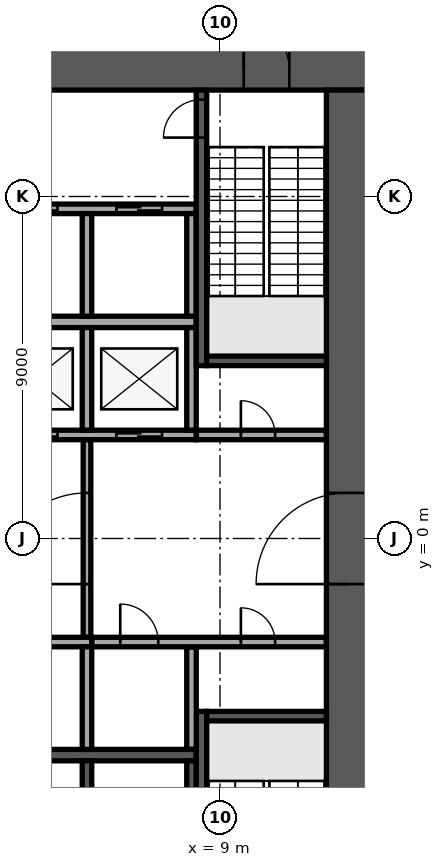
"""IFC4 building model, lengths in metres.
Left out: names, types, materials, properties, quantities, classifications, styles, units other than length and angle.
Written with IfcOpenShell. Run it as: python <this file> out.ifc"""

import sys

from ifc_helpers import new_model, si_unit, direction, frame, frame_2d, origin, place, context, subcontext, project, spatial, rectangle, extrude, element, fill, save


model = new_model("IFC4")
c1 = context("Model", 3, precision=1e-05, world=origin(), true_north=direction((0.0, 1.0)))
c2 = subcontext(c1, "Body", "Model", "MODEL_VIEW")
j1 = project(units=[si_unit("LENGTHUNIT", "METRE"), si_unit("PLANEANGLEUNIT", "RADIAN")], contexts=[c1])
p1 = place(None, origin())
s1 = spatial("IfcSite", under=j1, at=p1, CompositionType="ELEMENT")
p2 = place(p1, origin())
s2 = spatial("IfcBuilding", under=s1, at=p2, CompositionType="ELEMENT")
p3 = place(p2, frame((0.0, 0.0, 130.1)))
s3 = spatial("IfcBuildingStorey", under=s2, at=p3, CompositionType="ELEMENT", Elevation=130.1)
p4 = place(p3, frame((-12.9, 12.35, 0.0), z_axis=(0.0, 0.0, 1.0), x_axis=(1.0, 0.0, 0.0)))
e1 = element("IfcWall", 1, at=p4, inside=s3, PredefinedType="SHEAR", context=c2, shape_type="SweptSolid", body=[
    extrude(rectangle(XDim=25.8, YDim=1.1, at=frame_2d((12.9, 0.0))), origin(), (0.0, 0.0, 1.0), 5.2),
])
p5 = place(p4, frame((11.7, 0.0, 0.0)))
e2 = element("IfcOpeningElement", 2, at=p5, cuts=e1, PredefinedType="OPENING", context=c2, shape_type="SweptSolid", body=[
    extrude(rectangle(XDim=2.4, YDim=2.4, at=frame_2d((1.2, 1.2))), frame((0.0, 0.56, 0.0), z_axis=(0.0, -1.0, 0.0), x_axis=(1.0, 0.0, 0.0)), (0.0, 0.0, 1.0), 1.12),
])
p6 = place(p4, frame((22.525, 0.0, 0.0)))
e3 = element("IfcOpeningElement", 3, at=p6, cuts=e1, PredefinedType="OPENING", context=c2, shape_type="SweptSolid", body=[
    extrude(rectangle(XDim=1.2, YDim=2.1, at=frame_2d((0.6, 1.05))), frame((0.0, 0.56, 0.0), z_axis=(0.0, -1.0, 0.0), x_axis=(1.0, 0.0, 0.0)), (0.0, 0.0, 1.0), 1.12),
])
p7 = place(p4, frame((1.5, 0.0, 0.0)))
e4 = element("IfcOpeningElement", 4, at=p7, cuts=e1, PredefinedType="OPENING", context=c2, shape_type="SweptSolid", body=[
    extrude(rectangle(XDim=1.0, YDim=2.1, at=frame_2d((0.5, 1.05))), frame((0.0, 0.56, 0.0), z_axis=(0.0, -1.0, 0.0), x_axis=(1.0, 0.0, 0.0)), (0.0, 0.0, 1.0), 1.12),
])
p8 = place(p3, frame((12.35, -11.8, 0.0), z_axis=(0.0, 0.0, 1.0), x_axis=(0.0, 1.0, 0.0)))
e5 = element("IfcWall", 5, at=p8, inside=s3, PredefinedType="SHEAR", context=c2, shape_type="SweptSolid", body=[
    extrude(rectangle(XDim=23.6, YDim=1.1, at=frame_2d((11.8, 0.0))), origin(), (0.0, 0.0, 1.0), 5.2),
])
p9 = place(p8, frame((10.6, 0.0, 0.0)))
e6 = element("IfcOpeningElement", 6, at=p9, cuts=e5, PredefinedType="OPENING", context=c2, shape_type="SweptSolid", body=[
    extrude(rectangle(XDim=2.4, YDim=2.4, at=frame_2d((1.2, 1.2))), frame((0.0, 0.56, 0.0), z_axis=(0.0, -1.0, 0.0), x_axis=(1.0, 0.0, 0.0)), (0.0, 0.0, 1.0), 1.12),
])
for number, where, z_axis, x_axis in (
    (7, (-8.375, 5.7, 0.0), (0.0, 0.0, 1.0), (1.0, 0.0, 0.0)),
    (8, (-8.375, -5.7, 0.0), (0.0, 0.0, 1.0), (1.0, 0.0, 0.0)),
):
    element("IfcWall", number, at=place(p3, frame(where, z_axis=z_axis, x_axis=x_axis)), inside=s3, PredefinedType="SOLIDWALL", context=c2, shape_type="SweptSolid", body=[
        extrude(rectangle(XDim=16.75, YDim=0.3, at=frame_2d((8.375, 0.0))), origin(), (0.0, 0.0, 1.0), 5.2),
    ])
p10 = place(p3, frame((-8.375, 2.725, 0.0), z_axis=(0.0, 0.0, 1.0), x_axis=(1.0, 0.0, 0.0)))
e9 = element("IfcWall", 9, at=p10, inside=s3, PredefinedType="SOLIDWALL", context=c2, shape_type="SweptSolid", body=[
    extrude(rectangle(XDim=16.75, YDim=0.25, at=frame_2d((8.375, 0.0))), origin(), (0.0, 0.0, 1.0), 5.2),
])
p11 = place(p10, frame((0.9, 0.0, 0.0)))
e10 = element("IfcOpeningElement", 10, at=p11, cuts=e9, PredefinedType="OPENING", context=c2, shape_type="SweptSolid", body=[
    extrude(rectangle(XDim=1.2, YDim=2.1, at=frame_2d((0.6, 1.05))), frame((0.0, 0.135, 0.0), z_axis=(0.0, -1.0, 0.0), x_axis=(1.0, 0.0, 0.0)), (0.0, 0.0, 1.0), 0.27),
])
p12 = place(p10, frame((3.65, 0.0, 0.0)))
e11 = element("IfcOpeningElement", 11, at=p12, cuts=e9, PredefinedType="OPENING", context=c2, shape_type="SweptSolid", body=[
    extrude(rectangle(XDim=1.2, YDim=2.1, at=frame_2d((0.6, 1.05))), frame((0.0, 0.135, 0.0), z_axis=(0.0, -1.0, 0.0), x_axis=(1.0, 0.0, 0.0)), (0.0, 0.0, 1.0), 0.27),
])
p13 = place(p10, frame((6.4, 0.0, 0.0)))
e12 = element("IfcOpeningElement", 12, at=p13, cuts=e9, PredefinedType="OPENING", context=c2, shape_type="SweptSolid", body=[
    extrude(rectangle(XDim=1.2, YDim=2.1, at=frame_2d((0.6, 1.05))), frame((0.0, 0.135, 0.0), z_axis=(0.0, -1.0, 0.0), x_axis=(1.0, 0.0, 0.0)), (0.0, 0.0, 1.0), 0.27),
])
p14 = place(p10, frame((9.15, 0.0, 0.0)))
e13 = element("IfcOpeningElement", 13, at=p14, cuts=e9, PredefinedType="OPENING", context=c2, shape_type="SweptSolid", body=[
    extrude(rectangle(XDim=1.2, YDim=2.1, at=frame_2d((0.6, 1.05))), frame((0.0, 0.135, 0.0), z_axis=(0.0, -1.0, 0.0), x_axis=(1.0, 0.0, 0.0)), (0.0, 0.0, 1.0), 0.27),
])
p15 = place(p10, frame((11.9, 0.0, 0.0)))
e14 = element("IfcOpeningElement", 14, at=p15, cuts=e9, PredefinedType="OPENING", context=c2, shape_type="SweptSolid", body=[
    extrude(rectangle(XDim=1.2, YDim=2.1, at=frame_2d((0.6, 1.05))), frame((0.0, 0.135, 0.0), z_axis=(0.0, -1.0, 0.0), x_axis=(1.0, 0.0, 0.0)), (0.0, 0.0, 1.0), 0.27),
])
p16 = place(p10, frame((14.65, 0.0, 0.0)))
e15 = element("IfcOpeningElement", 15, at=p16, cuts=e9, PredefinedType="OPENING", context=c2, shape_type="SweptSolid", body=[
    extrude(rectangle(XDim=1.2, YDim=2.1, at=frame_2d((0.6, 1.05))), frame((0.0, 0.135, 0.0), z_axis=(0.0, -1.0, 0.0), x_axis=(1.0, 0.0, 0.0)), (0.0, 0.0, 1.0), 0.27),
])
for number, where, z_axis, x_axis in (
    (16, (5.5, 2.85, 0.0), (0.0, 0.0, 1.0), (0.0, 1.0, 0.0)),
    (17, (8.25, 2.85, 0.0), (0.0, 0.0, 1.0), (0.0, 1.0, 0.0)),
):
    element("IfcWall", number, at=place(p3, frame(where, z_axis=z_axis, x_axis=x_axis)), inside=s3, PredefinedType="SOLIDWALL", context=c2, shape_type="SweptSolid", body=[
        extrude(rectangle(XDim=2.7, YDim=0.25, at=frame_2d((1.35, 0.0))), origin(), (0.0, 0.0, 1.0), 5.2),
    ])
p17 = place(p3, frame((-8.375, 8.675, 0.0), z_axis=(0.0, 0.0, 1.0), x_axis=(1.0, 0.0, 0.0)))
e18 = element("IfcWall", 18, at=p17, inside=s3, PredefinedType="SOLIDWALL", context=c2, shape_type="SweptSolid", body=[
    extrude(rectangle(XDim=16.75, YDim=0.25, at=frame_2d((8.375, 0.0))), origin(), (0.0, 0.0, 1.0), 5.2),
])
p18 = place(p17, frame((0.9, 0.0, 0.0)))
e19 = element("IfcOpeningElement", 19, at=p18, cuts=e18, PredefinedType="OPENING", context=c2, shape_type="SweptSolid", body=[
    extrude(rectangle(XDim=1.2, YDim=2.1, at=frame_2d((0.6, 1.05))), frame((0.0, 0.135, 0.0), z_axis=(0.0, -1.0, 0.0), x_axis=(1.0, 0.0, 0.0)), (0.0, 0.0, 1.0), 0.27),
])
p19 = place(p17, frame((3.65, 0.0, 0.0)))
e20 = element("IfcOpeningElement", 20, at=p19, cuts=e18, PredefinedType="OPENING", context=c2, shape_type="SweptSolid", body=[
    extrude(rectangle(XDim=1.2, YDim=2.1, at=frame_2d((0.6, 1.05))), frame((0.0, 0.135, 0.0), z_axis=(0.0, -1.0, 0.0), x_axis=(1.0, 0.0, 0.0)), (0.0, 0.0, 1.0), 0.27),
])
p20 = place(p17, frame((6.4, 0.0, 0.0)))
e21 = element("IfcOpeningElement", 21, at=p20, cuts=e18, PredefinedType="OPENING", context=c2, shape_type="SweptSolid", body=[
    extrude(rectangle(XDim=1.2, YDim=2.1, at=frame_2d((0.6, 1.05))), frame((0.0, 0.135, 0.0), z_axis=(0.0, -1.0, 0.0), x_axis=(1.0, 0.0, 0.0)), (0.0, 0.0, 1.0), 0.27),
])
p21 = place(p17, frame((9.15, 0.0, 0.0)))
e22 = element("IfcOpeningElement", 22, at=p21, cuts=e18, PredefinedType="OPENING", context=c2, shape_type="SweptSolid", body=[
    extrude(rectangle(XDim=1.2, YDim=2.1, at=frame_2d((0.6, 1.05))), frame((0.0, 0.135, 0.0), z_axis=(0.0, -1.0, 0.0), x_axis=(1.0, 0.0, 0.0)), (0.0, 0.0, 1.0), 0.27),
])
p22 = place(p17, frame((11.9, 0.0, 0.0)))
e23 = element("IfcOpeningElement", 23, at=p22, cuts=e18, PredefinedType="OPENING", context=c2, shape_type="SweptSolid", body=[
    extrude(rectangle(XDim=1.2, YDim=2.1, at=frame_2d((0.6, 1.05))), frame((0.0, 0.135, 0.0), z_axis=(0.0, -1.0, 0.0), x_axis=(1.0, 0.0, 0.0)), (0.0, 0.0, 1.0), 0.27),
])
p23 = place(p17, frame((14.65, 0.0, 0.0)))
e24 = element("IfcOpeningElement", 24, at=p23, cuts=e18, PredefinedType="OPENING", context=c2, shape_type="SweptSolid", body=[
    extrude(rectangle(XDim=1.2, YDim=2.1, at=frame_2d((0.6, 1.05))), frame((0.0, 0.135, 0.0), z_axis=(0.0, -1.0, 0.0), x_axis=(1.0, 0.0, 0.0)), (0.0, 0.0, 1.0), 0.27),
])
for number, where, z_axis, x_axis in (
    (25, (5.5, 5.85, 0.0), (0.0, 0.0, 1.0), (0.0, 1.0, 0.0)),
    (26, (8.25, 5.85, 0.0), (0.0, 0.0, 1.0), (0.0, 1.0, 0.0)),
):
    element("IfcWall", number, at=place(p3, frame(where, z_axis=z_axis, x_axis=x_axis)), inside=s3, PredefinedType="SOLIDWALL", context=c2, shape_type="SweptSolid", body=[
        extrude(rectangle(XDim=2.7, YDim=0.25, at=frame_2d((1.35, 0.0))), origin(), (0.0, 0.0, 1.0), 5.2),
    ])
p24 = place(p3, frame((-8.375, -2.725, 0.0), z_axis=(0.0, 0.0, 1.0), x_axis=(1.0, 0.0, 0.0)))
e27 = element("IfcWall", 27, at=p24, inside=s3, PredefinedType="SOLIDWALL", context=c2, shape_type="SweptSolid", body=[
    extrude(rectangle(XDim=14.0, YDim=0.25, at=frame_2d((7.0, 0.0))), origin(), (0.0, 0.0, 1.0), 5.2),
])
p25 = place(p24, frame((0.9, 0.0, 0.0)))
e28 = element("IfcOpeningElement", 28, at=p25, cuts=e27, PredefinedType="OPENING", context=c2, shape_type="SweptSolid", body=[
    extrude(rectangle(XDim=1.2, YDim=2.1, at=frame_2d((0.6, 1.05))), frame((0.0, 0.135, 0.0), z_axis=(0.0, -1.0, 0.0), x_axis=(1.0, 0.0, 0.0)), (0.0, 0.0, 1.0), 0.27),
])
p26 = place(p24, frame((3.65, 0.0, 0.0)))
e29 = element("IfcOpeningElement", 29, at=p26, cuts=e27, PredefinedType="OPENING", context=c2, shape_type="SweptSolid", body=[
    extrude(rectangle(XDim=1.2, YDim=2.1, at=frame_2d((0.6, 1.05))), frame((0.0, 0.135, 0.0), z_axis=(0.0, -1.0, 0.0), x_axis=(1.0, 0.0, 0.0)), (0.0, 0.0, 1.0), 0.27),
])
for number, where, z_axis, x_axis in (
    (30, (5.5, -5.55, 0.0), (0.0, 0.0, 1.0), (0.0, 1.0, 0.0)),
    (31, (5.5, -8.55, 0.0), (0.0, 0.0, 1.0), (0.0, 1.0, 0.0)),
    (32, (8.25, -8.55, 0.0), (0.0, 0.0, 1.0), (0.0, 1.0, 0.0)),
):
    element("IfcWall", number, at=place(p3, frame(where, z_axis=z_axis, x_axis=x_axis)), inside=s3, PredefinedType="SOLIDWALL", context=c2, shape_type="SweptSolid", body=[
        extrude(rectangle(XDim=2.7, YDim=0.25, at=frame_2d((1.35, 0.0))), origin(), (0.0, 0.0, 1.0), 5.2),
    ])
p27 = place(p3, frame((8.512, 4.55, 0.0), z_axis=(0.0, 0.0, 1.0), x_axis=(0.0, 1.0, 0.0)))
e33 = element("IfcWall", 33, at=p27, inside=s3, PredefinedType="SOLIDWALL", context=c2, shape_type="SweptSolid", body=[
    extrude(rectangle(XDim=7.25, YDim=0.275, at=frame_2d((3.625, 0.0))), origin(), (0.0, 0.0, 1.0), 5.2),
])
p28 = place(p27, frame((6.0, 0.0, 0.0)))
e34 = element("IfcOpeningElement", 34, at=p28, cuts=e33, PredefinedType="OPENING", context=c2, shape_type="SweptSolid", body=[
    extrude(rectangle(XDim=1.0, YDim=2.1, at=frame_2d((0.5, 1.05))), frame((0.0, 0.147, 0.0), z_axis=(0.0, -1.0, 0.0), x_axis=(1.0, 0.0, 0.0)), (0.0, 0.0, 1.0), 0.295),
])
p29 = place(p3, frame((8.65, 4.675, 0.0), z_axis=(0.0, 0.0, 1.0), x_axis=(1.0, 0.0, 0.0)))
e35 = element("IfcWall", 35, at=p29, inside=s3, PredefinedType="SOLIDWALL", context=c2, shape_type="SweptSolid", body=[
    extrude(rectangle(XDim=3.15, YDim=0.25, at=frame_2d((1.575, 0.0))), origin(), (0.0, 0.0, 1.0), 5.2),
])
p30 = place(p3, frame((8.512, -4.55, 0.0), z_axis=(0.0, 0.0, 1.0), x_axis=(0.0, -1.0, 0.0)))
e36 = element("IfcWall", 36, at=p30, inside=s3, PredefinedType="SOLIDWALL", context=c2, shape_type="SweptSolid", body=[
    extrude(rectangle(XDim=7.25, YDim=0.275, at=frame_2d((3.625, 0.0))), origin(), (0.0, 0.0, 1.0), 5.2),
])
p31 = place(p30, frame((6.0, 0.0, 0.0)))
e37 = element("IfcOpeningElement", 37, at=p31, cuts=e36, PredefinedType="OPENING", context=c2, shape_type="SweptSolid", body=[
    extrude(rectangle(XDim=1.0, YDim=2.1, at=frame_2d((0.5, 1.05))), frame((0.0, 0.147, 0.0), z_axis=(0.0, -1.0, 0.0), x_axis=(1.0, 0.0, 0.0)), (0.0, 0.0, 1.0), 0.295),
])
p32 = place(p3, frame((8.65, -4.675, 0.0), z_axis=(0.0, 0.0, 1.0), x_axis=(1.0, 0.0, 0.0)))
e38 = element("IfcWall", 38, at=p32, inside=s3, PredefinedType="SOLIDWALL", context=c2, shape_type="SweptSolid", body=[
    extrude(rectangle(XDim=3.15, YDim=0.25, at=frame_2d((1.575, 0.0))), origin(), (0.0, 0.0, 1.0), 5.2),
])
p33 = place(p3, frame((8.25, -5.545, 0.0), z_axis=(0.0, 0.0, 1.0), x_axis=(0.0, 1.0, 0.0)))
e39 = element("IfcWall", 39, at=p33, inside=s3, PredefinedType="PARTITIONING", context=c2, shape_type="SweptSolid", body=[
    extrude(rectangle(XDim=2.69, YDim=0.25, at=frame_2d((1.345, 0.0))), origin(), (0.0, 0.0, 1.0), 5.2),
])
p34 = place(p3, frame((5.63, -2.725, 0.0), z_axis=(0.0, 0.0, 1.0), x_axis=(1.0, 0.0, 0.0)))
e40 = element("IfcWall", 40, at=p34, inside=s3, PredefinedType="PARTITIONING", context=c2, shape_type="SweptSolid", body=[
    extrude(rectangle(XDim=6.165, YDim=0.25, at=frame_2d((3.083, 0.0))), origin(), (0.0, 0.0, 1.0), 5.2),
])
p35 = place(p34, frame((0.745, 0.0, 0.0)))
e41 = element("IfcOpeningElement", 41, at=p35, cuts=e40, PredefinedType="OPENING", context=c2, shape_type="SweptSolid", body=[
    extrude(rectangle(XDim=1.0, YDim=2.1, at=frame_2d((0.5, 1.05))), frame((0.0, 0.135, 0.0), z_axis=(0.0, -1.0, 0.0), x_axis=(1.0, 0.0, 0.0)), (0.0, 0.0, 1.0), 0.27),
])
p36 = place(p34, frame((3.92, 0.0, 0.0)))
e42 = element("IfcOpeningElement", 42, at=p36, cuts=e40, PredefinedType="OPENING", context=c2, shape_type="SweptSolid", body=[
    extrude(rectangle(XDim=0.9, YDim=2.1, at=frame_2d((0.45, 1.05))), frame((0.0, 0.135, 0.0), z_axis=(0.0, -1.0, 0.0), x_axis=(1.0, 0.0, 0.0)), (0.0, 0.0, 1.0), 0.27),
])
p37 = place(p3, frame((5.5, -2.595, 0.0), z_axis=(0.0, 0.0, 1.0), x_axis=(0.0, 1.0, 0.0)))
e43 = element("IfcWall", 43, at=p37, inside=s3, PredefinedType="PARTITIONING", context=c2, shape_type="SweptSolid", body=[
    extrude(rectangle(XDim=5.19, YDim=0.2, at=frame_2d((2.595, 0.0))), origin(), (0.0, 0.0, 1.0), 5.2),
])
p38 = place(p37, frame((1.395, 0.0, 0.0)))
e44 = element("IfcOpeningElement", 44, at=p38, cuts=e43, PredefinedType="OPENING", context=c2, shape_type="SweptSolid", body=[
    extrude(rectangle(XDim=2.4, YDim=2.4, at=frame_2d((1.2, 1.2))), frame((0.0, 0.11, 0.0), z_axis=(0.0, -1.0, 0.0), x_axis=(1.0, 0.0, 0.0)), (0.0, 0.0, 1.0), 0.22),
])
p39 = place(p3, frame((8.38, 2.725, 0.0), z_axis=(0.0, 0.0, 1.0), x_axis=(1.0, 0.0, 0.0)))
e45 = element("IfcWall", 45, at=p39, inside=s3, PredefinedType="PARTITIONING", context=c2, shape_type="SweptSolid", body=[
    extrude(rectangle(XDim=3.415, YDim=0.25, at=frame_2d((1.708, 0.0))), origin(), (0.0, 0.0, 1.0), 5.2),
])
p40 = place(p39, frame((1.17, 0.0, 0.0)))
e46 = element("IfcOpeningElement", 46, at=p40, cuts=e45, PredefinedType="OPENING", context=c2, shape_type="SweptSolid", body=[
    extrude(rectangle(XDim=0.9, YDim=2.1, at=frame_2d((0.45, 1.05))), frame((0.0, 0.135, 0.0), z_axis=(0.0, -1.0, 0.0), x_axis=(1.0, 0.0, 0.0)), (0.0, 0.0, 1.0), 0.27),
])
p41 = place(p6, origin())
e47 = element("IfcDoor", 47, at=p41, inside=s3, OperationType="SINGLE_SWING_LEFT", PredefinedType="DOOR", context=c2, shape_type="SweptSolid", body=[
    extrude(rectangle(XDim=1.2, YDim=2.1, at=frame_2d((0.6, 1.05))), frame((0.0, 0.025, 0.0), z_axis=(0.0, -1.0, 0.0), x_axis=(1.0, 0.0, 0.0)), (0.0, 0.0, 1.0), 0.05),
])
fill(e3, e47)
p42 = place(p9, origin())
e48 = element("IfcDoor", 48, at=p42, inside=s3, OperationType="SINGLE_SWING_LEFT", PredefinedType="DOOR", context=c2, shape_type="SweptSolid", body=[
    extrude(rectangle(XDim=2.4, YDim=2.4, at=frame_2d((1.2, 1.2))), frame((0.0, 0.025, 0.0), z_axis=(0.0, -1.0, 0.0), x_axis=(1.0, 0.0, 0.0)), (0.0, 0.0, 1.0), 0.05),
])
fill(e6, e48)
p43 = place(p15, origin())
e49 = element("IfcDoor", 49, at=p43, inside=s3, OperationType="DOUBLE_DOOR_SLIDING", PredefinedType="DOOR", context=c2, shape_type="SweptSolid", body=[
    extrude(rectangle(XDim=1.2, YDim=2.1, at=frame_2d((0.6, 1.05))), frame((0.0, 0.025, 0.0), z_axis=(0.0, -1.0, 0.0), x_axis=(1.0, 0.0, 0.0)), (0.0, 0.0, 1.0), 0.05),
])
fill(e14, e49)
p44 = place(p16, origin())
e50 = element("IfcDoor", 50, at=p44, inside=s3, OperationType="DOUBLE_DOOR_SLIDING", PredefinedType="DOOR", context=c2, shape_type="SweptSolid", body=[
    extrude(rectangle(XDim=1.2, YDim=2.1, at=frame_2d((0.6, 1.05))), frame((0.0, 0.025, 0.0), z_axis=(0.0, -1.0, 0.0), x_axis=(1.0, 0.0, 0.0)), (0.0, 0.0, 1.0), 0.05),
])
fill(e15, e50)
p45 = place(p22, origin())
e51 = element("IfcDoor", 51, at=p45, inside=s3, OperationType="DOUBLE_DOOR_SLIDING", PredefinedType="DOOR", context=c2, shape_type="SweptSolid", body=[
    extrude(rectangle(XDim=1.2, YDim=2.1, at=frame_2d((0.6, 1.05))), frame((0.0, 0.025, 0.0), z_axis=(0.0, -1.0, 0.0), x_axis=(1.0, 0.0, 0.0)), (0.0, 0.0, 1.0), 0.05),
])
fill(e23, e51)
p46 = place(p23, origin())
e52 = element("IfcDoor", 52, at=p46, inside=s3, OperationType="DOUBLE_DOOR_SLIDING", PredefinedType="DOOR", context=c2, shape_type="SweptSolid", body=[
    extrude(rectangle(XDim=1.2, YDim=2.1, at=frame_2d((0.6, 1.05))), frame((0.0, 0.025, 0.0), z_axis=(0.0, -1.0, 0.0), x_axis=(1.0, 0.0, 0.0)), (0.0, 0.0, 1.0), 0.05),
])
fill(e24, e52)
p47 = place(p28, origin())
e53 = element("IfcDoor", 53, at=p47, inside=s3, OperationType="SINGLE_SWING_LEFT", PredefinedType="DOOR", context=c2, shape_type="SweptSolid", body=[
    extrude(rectangle(XDim=1.0, YDim=2.1, at=frame_2d((0.5, 1.05))), frame((0.0, 0.025, 0.0), z_axis=(0.0, -1.0, 0.0), x_axis=(1.0, 0.0, 0.0)), (0.0, 0.0, 1.0), 0.05),
])
fill(e34, e53)
p48 = place(p35, origin())
e54 = element("IfcDoor", 54, at=p48, inside=s3, OperationType="SINGLE_SWING_LEFT", PredefinedType="DOOR", context=c2, shape_type="SweptSolid", body=[
    extrude(rectangle(XDim=1.0, YDim=2.1, at=frame_2d((0.5, 1.05))), frame((0.0, 0.025, 0.0), z_axis=(0.0, -1.0, 0.0), x_axis=(1.0, 0.0, 0.0)), (0.0, 0.0, 1.0), 0.05),
])
fill(e41, e54)
p49 = place(p40, origin())
e55 = element("IfcDoor", 55, at=p49, inside=s3, OperationType="SINGLE_SWING_LEFT", PredefinedType="DOOR", context=c2, shape_type="SweptSolid", body=[
    extrude(rectangle(XDim=0.9, YDim=2.1, at=frame_2d((0.45, 1.05))), frame((0.0, 0.025, 0.0), z_axis=(0.0, -1.0, 0.0), x_axis=(1.0, 0.0, 0.0)), (0.0, 0.0, 1.0), 0.05),
])
fill(e46, e55)
p50 = place(p36, origin())
e56 = element("IfcDoor", 56, at=p50, inside=s3, OperationType="SINGLE_SWING_LEFT", PredefinedType="DOOR", context=c2, shape_type="SweptSolid", body=[
    extrude(rectangle(XDim=0.9, YDim=2.1, at=frame_2d((0.45, 1.05))), frame((0.0, 0.025, 0.0), z_axis=(0.0, -1.0, 0.0), x_axis=(1.0, 0.0, 0.0)), (0.0, 0.0, 1.0), 0.05),
])
fill(e42, e56)
p51 = place(p38, origin())
e57 = element("IfcDoor", 57, at=p51, inside=s3, OperationType="SINGLE_SWING_LEFT", PredefinedType="DOOR", context=c2, shape_type="SweptSolid", body=[
    extrude(rectangle(XDim=2.4, YDim=2.4, at=frame_2d((1.2, 1.2))), frame((0.0, 0.025, 0.0), z_axis=(0.0, -1.0, 0.0), x_axis=(1.0, 0.0, 0.0)), (0.0, 0.0, 1.0), 0.05),
])
fill(e44, e57)
save(model, sys.argv[1])
